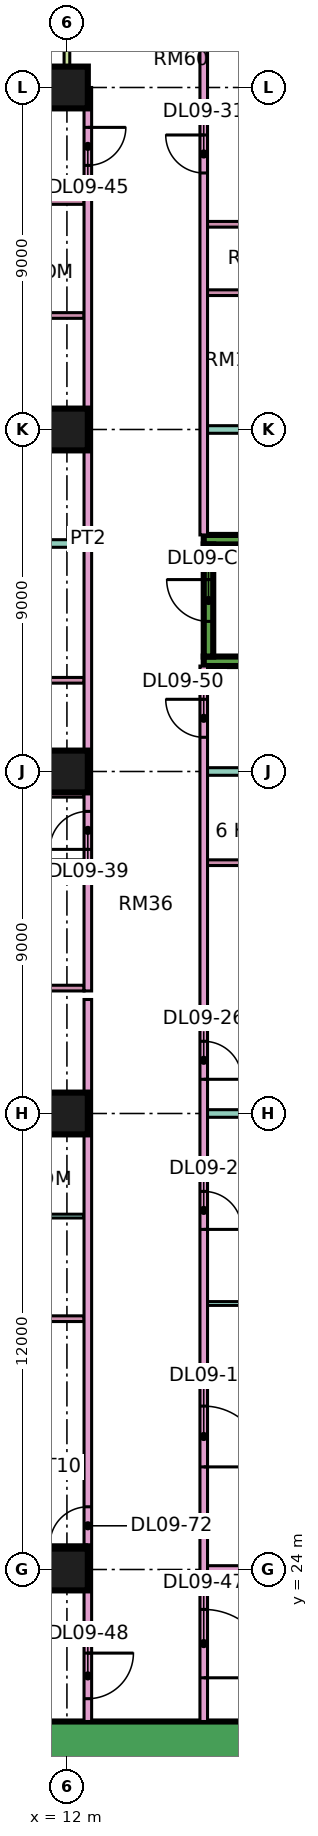
"""IFC4 building model, lengths in metres.
Left out: names, types, materials, properties, quantities, classifications, styles, units other than length and angle.
Written with IfcOpenShell. Run it as: python <this file> out.ifc"""

import sys

from ifc_helpers import new_model, si_unit, direction, frame, frame_2d, origin, origin_2d, place, context, subcontext, project, spatial, rectangle, extrude, element, fill, save


model = new_model("IFC4")
c1 = context("Model", 3, precision=1e-05, world=origin(), true_north=direction((0.0, 1.0)))
c2 = subcontext(c1, "Body", "Model", "MODEL_VIEW")
j1 = project(units=[si_unit("LENGTHUNIT", "METRE"), si_unit("PLANEANGLEUNIT", "RADIAN")], contexts=[c1])
p1 = place(None, origin())
s1 = spatial("IfcSite", under=j1, at=p1, CompositionType="ELEMENT")
p2 = place(p1, origin())
s2 = spatial("IfcBuilding", under=s1, at=p2, CompositionType="ELEMENT")
p3 = place(p2, frame((0.0, 0.0, 48.9)))
s3 = spatial("IfcBuildingStorey", under=s2, at=p3, CompositionType="ELEMENT", Elevation=48.9)
for number, where, z_axis, x_axis in (
    (1, (12.0, 24.0, 0.0), (0.0, 0.0, 1.0), (1.0, 0.0, 0.0)),
    (2, (12.0, 36.0, 0.0), (0.0, 0.0, 1.0), (1.0, 0.0, 0.0)),
    (3, (12.0, 45.0, 0.0), (0.0, 0.0, 1.0), (1.0, 0.0, 0.0)),
    (4, (12.0, 54.0, 0.0), (0.0, 0.0, 1.0), (1.0, 0.0, 0.0)),
    (5, (12.0, 63.0, 0.0), (0.0, 0.0, 1.0), (1.0, 0.0, 0.0)),
):
    element("IfcColumn", number, at=place(p3, frame(where, z_axis=z_axis, x_axis=x_axis)), inside=s3, PredefinedType="COLUMN", context=c2, shape_type="SweptSolid", body=[
        extrude(rectangle(XDim=1.1, YDim=1.1, at=origin_2d()), origin(), (0.0, 0.0, 1.0), 3.75),
    ])
p4 = place(p3, frame((9.0, 19.45, 0.0), z_axis=(0.0, 0.0, 1.0), x_axis=(1.0, 0.0, 0.0)))
e6 = element("IfcWall", 6, at=p4, inside=s3, PredefinedType="SHEAR", context=c2, shape_type="SweptSolid", body=[
    extrude(rectangle(XDim=25.0, YDim=1.1, at=frame_2d((12.5, 0.0))), origin(), (0.0, 0.0, 1.0), 3.75),
])
p5 = place(p4, frame((19.1, 0.0, 0.0)))
e7 = element("IfcOpeningElement", 7, at=p5, cuts=e6, PredefinedType="OPENING", context=c2, shape_type="SweptSolid", body=[
    extrude(rectangle(XDim=1.8, YDim=2.4, at=frame_2d((0.9, 1.2))), frame((0.0, 0.56, 0.0), z_axis=(0.0, -1.0, 0.0), x_axis=(1.0, 0.0, 0.0)), (0.0, 0.0, 1.0), 1.12),
])
for number, where, z_axis, x_axis in (
    (8, (15.6, 47.9, 0.0), (0.0, 0.0, 1.0), (1.0, 0.0, 0.0)),
    (9, (15.6, 51.1, 0.0), (0.0, 0.0, 1.0), (1.0, 0.0, 0.0)),
):
    element("IfcWall", number, at=place(p3, frame(where, z_axis=z_axis, x_axis=x_axis)), inside=s3, PredefinedType="SHEAR", context=c2, shape_type="SweptSolid", body=[
        extrude(rectangle(XDim=7.0, YDim=0.25, at=frame_2d((3.5, 0.0))), origin(), (0.0, 0.0, 1.0), 3.75),
    ])
p6 = place(p3, frame((15.725, 48.025, 0.0), z_axis=(0.0, 0.0, 1.0), x_axis=(0.0, 1.0, 0.0)))
e10 = element("IfcWall", 10, at=p6, inside=s3, PredefinedType="SHEAR", context=c2, shape_type="SweptSolid", body=[
    extrude(rectangle(XDim=2.95, YDim=0.25, at=frame_2d((1.475, 0.0))), origin(), (0.0, 0.0, 1.0), 3.75),
])
p7 = place(p6, frame((0.925, 0.0, 0.0)))
e11 = element("IfcOpeningElement", 11, at=p7, cuts=e10, PredefinedType="OPENING", context=c2, shape_type="SweptSolid", body=[
    extrude(rectangle(XDim=1.1, YDim=2.2, at=frame_2d((0.55, 1.1))), frame((0.0, 0.135, 0.0), z_axis=(0.0, -1.0, 0.0), x_axis=(1.0, 0.0, 0.0)), (0.0, 0.0, 1.0), 0.27),
])
p8 = place(p3, frame((11.925, 63.0, 0.0), z_axis=(0.0, 0.0, 1.0), x_axis=(-1.0, 0.0, 0.0)))
e12 = element("IfcWall", 12, at=p8, inside=s3, PredefinedType="SOLIDWALL", context=c2, shape_type="SweptSolid", body=[
    extrude(rectangle(XDim=10.35, YDim=0.15, at=frame_2d((5.175, 0.0))), origin(), (0.0, 0.0, 1.0), 3.35),
])
p9 = place(p8, frame((1.775, 0.0, 0.0)))
e13 = element("IfcOpeningElement", 13, at=p9, cuts=e12, PredefinedType="OPENING", context=c2, shape_type="SweptSolid", body=[
    extrude(rectangle(XDim=1.8, YDim=2.4, at=frame_2d((0.9, 1.2))), frame((0.0, 0.085, 0.0), z_axis=(0.0, -1.0, 0.0), x_axis=(1.0, 0.0, 0.0)), (0.0, 0.0, 1.0), 0.17),
])
p10 = place(p8, frame((6.062, 0.0, 0.45)))
e14 = element("IfcOpeningElement", 14, at=p10, cuts=e12, PredefinedType="OPENING", context=c2, shape_type="SweptSolid", body=[
    extrude(rectangle(XDim=3.0, YDim=2.4, at=frame_2d((1.5, 1.2))), frame((0.0, 0.085, 0.0), z_axis=(0.0, -1.0, 0.0), x_axis=(1.0, 0.0, 0.0)), (0.0, 0.0, 1.0), 0.17),
])
p11 = place(p3, frame((12.0, 64.5, 0.0), z_axis=(0.0, 0.0, 1.0), x_axis=(0.0, -1.0, 0.0)))
e15 = element("IfcWall", 15, at=p11, inside=s3, PredefinedType="SOLIDWALL", context=c2, shape_type="SweptSolid", body=[
    extrude(rectangle(XDim=1.5, YDim=0.15, at=frame_2d((0.75, 0.0))), origin(), (0.0, 0.0, 1.0), 3.35),
])
p12 = place(p3, frame((-1.35, 22.4, 0.0), z_axis=(0.0, 0.0, 1.0), x_axis=(1.0, 0.0, 0.0)))
e16 = element("IfcWall", 16, at=p12, inside=s3, PredefinedType="PARTITIONING", context=c2, shape_type="SweptSolid", body=[
    extrude(rectangle(XDim=13.8, YDim=0.2, at=frame_2d((6.9, 0.0))), origin(), (0.0, 0.0, 1.0), 3.35),
])
p13 = place(p3, frame((0.0, 36.0, 0.0), z_axis=(0.0, 0.0, 1.0), x_axis=(1.0, 0.0, 0.0)))
e17 = element("IfcWall", 17, at=p13, inside=s3, PredefinedType="PARTITIONING", context=c2, shape_type="SweptSolid", body=[
    extrude(rectangle(XDim=12.45, YDim=0.2, at=frame_2d((6.225, 0.0))), origin(), (0.0, 0.0, 1.0), 3.35),
])
p14 = place(p3, frame((0.074, 51.0, 0.0), z_axis=(0.0, 0.0, 1.0), x_axis=(1.0, 0.0, 0.0)))
e18 = element("IfcWall", 18, at=p14, inside=s3, PredefinedType="PARTITIONING", context=c2, shape_type="SweptSolid", body=[
    extrude(rectangle(XDim=12.376, YDim=0.2, at=frame_2d((6.188, 0.0))), origin(), (0.0, 0.0, 1.0), 3.35),
])
p15 = place(p3, frame((7.075, 39.3, 0.0), z_axis=(0.0, 0.0, 1.0), x_axis=(1.0, 0.0, 0.0)))
e19 = element("IfcWall", 19, at=p15, inside=s3, PredefinedType="PARTITIONING", context=c2, shape_type="SweptSolid", body=[
    extrude(rectangle(XDim=5.375, YDim=0.15, at=frame_2d((2.688, 0.0))), origin(), (0.0, 0.0, 1.0), 3.35),
])
p16 = place(p3, frame((7.075, 42.6, 0.0), z_axis=(0.0, 0.0, 1.0), x_axis=(1.0, 0.0, 0.0)))
e20 = element("IfcWall", 20, at=p16, inside=s3, PredefinedType="PARTITIONING", context=c2, shape_type="SweptSolid", body=[
    extrude(rectangle(XDim=5.375, YDim=0.15, at=frame_2d((2.688, 0.0))), origin(), (0.0, 0.0, 1.0), 3.35),
])
p17 = place(p16, frame((2.425, 0.0, 0.0)))
e21 = element("IfcOpeningElement", 21, at=p17, cuts=e20, PredefinedType="OPENING", context=c2, shape_type="SweptSolid", body=[
    extrude(rectangle(XDim=0.8, YDim=2.1, at=frame_2d((0.4, 1.05))), frame((0.0, 0.085, 0.0), z_axis=(0.0, -1.0, 0.0), x_axis=(1.0, 0.0, 0.0)), (0.0, 0.0, 1.0), 0.17),
])
for number, where, z_axis, x_axis in (
    (22, (7.225, 44.4, 0.0), (0.0, 0.0, 1.0), (1.0, 0.0, 0.0)),
    (23, (7.225, 47.4, 0.0), (0.0, 0.0, 1.0), (1.0, 0.0, 0.0)),
):
    element("IfcWall", number, at=place(p3, frame(where, z_axis=z_axis, x_axis=x_axis)), inside=s3, PredefinedType="PARTITIONING", context=c2, shape_type="SweptSolid", body=[
        extrude(rectangle(XDim=5.225, YDim=0.15, at=frame_2d((2.612, 0.0))), origin(), (0.0, 0.0, 1.0), 3.35),
    ])
p18 = place(p3, frame((7.825, 26.7, 0.0), z_axis=(0.0, 0.0, 1.0), x_axis=(1.0, 0.0, 0.0)))
e24 = element("IfcWall", 24, at=p18, inside=s3, PredefinedType="PARTITIONING", context=c2, shape_type="SweptSolid", body=[
    extrude(rectangle(XDim=4.625, YDim=0.15, at=frame_2d((2.312, 0.0))), origin(), (0.0, 0.0, 1.0), 3.35),
])
p19 = place(p18, frame((1.975, 0.0, 0.0)))
e25 = element("IfcOpeningElement", 25, at=p19, cuts=e24, PredefinedType="OPENING", context=c2, shape_type="SweptSolid", body=[
    extrude(rectangle(XDim=0.8, YDim=2.1, at=frame_2d((0.4, 1.05))), frame((0.0, 0.085, 0.0), z_axis=(0.0, -1.0, 0.0), x_axis=(1.0, 0.0, 0.0)), (0.0, 0.0, 1.0), 0.17),
])
p20 = place(p3, frame((7.825, 30.6, 0.0), z_axis=(0.0, 0.0, 1.0), x_axis=(1.0, 0.0, 0.0)))
e26 = element("IfcWall", 26, at=p20, inside=s3, PredefinedType="PARTITIONING", context=c2, shape_type="SweptSolid", body=[
    extrude(rectangle(XDim=4.625, YDim=0.15, at=frame_2d((2.312, 0.0))), origin(), (0.0, 0.0, 1.0), 3.35),
])
p21 = place(p3, frame((7.825, 33.3, 0.0), z_axis=(0.0, 0.0, 1.0), x_axis=(1.0, 0.0, 0.0)))
e27 = element("IfcWall", 27, at=p21, inside=s3, PredefinedType="PARTITIONING", context=c2, shape_type="SweptSolid", body=[
    extrude(rectangle(XDim=4.625, YDim=0.1, at=frame_2d((2.312, 0.0))), origin(), (0.0, 0.0, 1.0), 3.35),
])
for number, where, z_axis, x_axis in (
    (28, (8.425, 57.0, 0.0), (0.0, 0.0, 1.0), (1.0, 0.0, 0.0)),
    (29, (8.425, 60.0, 0.0), (0.0, 0.0, 1.0), (1.0, 0.0, 0.0)),
):
    element("IfcWall", number, at=place(p3, frame(where, z_axis=z_axis, x_axis=x_axis)), inside=s3, PredefinedType="PARTITIONING", context=c2, shape_type="SweptSolid", body=[
        extrude(rectangle(XDim=4.025, YDim=0.15, at=frame_2d((2.012, 0.0))), origin(), (0.0, 0.0, 1.0), 3.35),
    ])
p22 = place(p3, frame((12.55, 20.0, 0.0), z_axis=(0.0, 0.0, 1.0), x_axis=(0.0, 1.0, 0.0)))
e30 = element("IfcWall", 30, at=p22, inside=s3, PredefinedType="PARTITIONING", context=c2, shape_type="SweptSolid", body=[
    extrude(rectangle(XDim=19.0, YDim=0.2, at=frame_2d((9.5, 0.0))), origin(), (0.0, 0.0, 1.0), 3.35),
])
p23 = place(p22, frame((0.6, 0.0, 0.0)))
e31 = element("IfcOpeningElement", 31, at=p23, cuts=e30, PredefinedType="OPENING", context=c2, shape_type="SweptSolid", body=[
    extrude(rectangle(XDim=1.2, YDim=2.1, at=frame_2d((0.6, 1.05))), frame((0.0, 0.11, 0.0), z_axis=(0.0, -1.0, 0.0), x_axis=(1.0, 0.0, 0.0)), (0.0, 0.0, 1.0), 0.22),
])
p24 = place(p22, frame((4.65, 0.0, 0.0)))
e32 = element("IfcOpeningElement", 32, at=p24, cuts=e30, PredefinedType="OPENING", context=c2, shape_type="SweptSolid", body=[
    extrude(rectangle(XDim=1.0, YDim=2.1, at=frame_2d((0.5, 1.05))), frame((0.0, 0.11, 0.0), z_axis=(0.0, -1.0, 0.0), x_axis=(1.0, 0.0, 0.0)), (0.0, 0.0, 1.0), 0.22),
])
p25 = place(p3, frame((12.55, 39.225, 0.0), z_axis=(0.0, 0.0, 1.0), x_axis=(0.0, 1.0, 0.0)))
e33 = element("IfcWall", 33, at=p25, inside=s3, PredefinedType="PARTITIONING", context=c2, shape_type="SweptSolid", body=[
    extrude(rectangle(XDim=23.775, YDim=0.2, at=frame_2d((11.887, 0.0))), origin(), (0.0, 0.0, 1.0), 3.35),
])
p26 = place(p25, frame((3.725, 0.0, 0.0)))
e34 = element("IfcOpeningElement", 34, at=p26, cuts=e33, PredefinedType="OPENING", context=c2, shape_type="SweptSolid", body=[
    extrude(rectangle(XDim=1.0, YDim=2.1, at=frame_2d((0.5, 1.05))), frame((0.0, 0.11, 0.0), z_axis=(0.0, -1.0, 0.0), x_axis=(1.0, 0.0, 0.0)), (0.0, 0.0, 1.0), 0.22),
])
p27 = place(p25, frame((21.725, 0.0, 0.0)))
e35 = element("IfcOpeningElement", 35, at=p27, cuts=e33, PredefinedType="OPENING", context=c2, shape_type="SweptSolid", body=[
    extrude(rectangle(XDim=1.0, YDim=2.1, at=frame_2d((0.5, 1.05))), frame((0.0, 0.11, 0.0), z_axis=(0.0, -1.0, 0.0), x_axis=(1.0, 0.0, 0.0)), (0.0, 0.0, 1.0), 0.22),
])
p28 = place(p3, frame((15.6, 20.0, 0.0), z_axis=(0.0, 0.0, 1.0), x_axis=(0.0, 1.0, 0.0)))
e36 = element("IfcWall", 36, at=p28, inside=s3, PredefinedType="PARTITIONING", context=c2, shape_type="SweptSolid", body=[
    extrude(rectangle(XDim=27.775, YDim=0.2, at=frame_2d((13.887, 0.0))), origin(), (0.0, 0.0, 1.0), 3.35),
])
p29 = place(p28, frame((6.7, 0.0, 0.0)))
e37 = element("IfcOpeningElement", 37, at=p29, cuts=e36, PredefinedType="OPENING", context=c2, shape_type="SweptSolid", body=[
    extrude(rectangle(XDim=1.6, YDim=2.1, at=frame_2d((0.8, 1.05))), frame((0.0, 0.11, 0.0), z_axis=(0.0, -1.0, 0.0), x_axis=(1.0, 0.0, 0.0)), (0.0, 0.0, 1.0), 0.22),
])
p30 = place(p28, frame((12.95, 0.0, 0.0)))
e38 = element("IfcOpeningElement", 38, at=p30, cuts=e36, PredefinedType="OPENING", context=c2, shape_type="SweptSolid", body=[
    extrude(rectangle(XDim=1.0, YDim=2.1, at=frame_2d((0.5, 1.05))), frame((0.0, 0.11, 0.0), z_axis=(0.0, -1.0, 0.0), x_axis=(1.0, 0.0, 0.0)), (0.0, 0.0, 1.0), 0.22),
])
p31 = place(p28, frame((16.9, 0.0, 0.0)))
e39 = element("IfcOpeningElement", 39, at=p31, cuts=e36, PredefinedType="OPENING", context=c2, shape_type="SweptSolid", body=[
    extrude(rectangle(XDim=1.0, YDim=2.1, at=frame_2d((0.5, 1.05))), frame((0.0, 0.11, 0.0), z_axis=(0.0, -1.0, 0.0), x_axis=(1.0, 0.0, 0.0)), (0.0, 0.0, 1.0), 0.22),
])
p32 = place(p28, frame((1.15, 0.0, 0.0)))
e40 = element("IfcOpeningElement", 40, at=p32, cuts=e36, PredefinedType="OPENING", context=c2, shape_type="SweptSolid", body=[
    extrude(rectangle(XDim=1.8, YDim=2.1, at=frame_2d((0.9, 1.05))), frame((0.0, 0.11, 0.0), z_axis=(0.0, -1.0, 0.0), x_axis=(1.0, 0.0, 0.0)), (0.0, 0.0, 1.0), 0.22),
])
p33 = place(p28, frame((25.9, 0.0, 0.0)))
e41 = element("IfcOpeningElement", 41, at=p33, cuts=e36, PredefinedType="OPENING", context=c2, shape_type="SweptSolid", body=[
    extrude(rectangle(XDim=1.0, YDim=2.1, at=frame_2d((0.5, 1.05))), frame((0.0, 0.11, 0.0), z_axis=(0.0, -1.0, 0.0), x_axis=(1.0, 0.0, 0.0)), (0.0, 0.0, 1.0), 0.22),
])
p34 = place(p3, frame((15.6, 51.225, 0.0), z_axis=(0.0, 0.0, 1.0), x_axis=(0.0, 1.0, 0.0)))
e42 = element("IfcWall", 42, at=p34, inside=s3, PredefinedType="PARTITIONING", context=c2, shape_type="SweptSolid", body=[
    extrude(rectangle(XDim=13.125, YDim=0.2, at=frame_2d((6.562, 0.0))), origin(), (0.0, 0.0, 1.0), 3.35),
])
p35 = place(p34, frame((9.525, 0.0, 0.0)))
e43 = element("IfcOpeningElement", 43, at=p35, cuts=e42, PredefinedType="OPENING", context=c2, shape_type="SweptSolid", body=[
    extrude(rectangle(XDim=1.0, YDim=2.1, at=frame_2d((0.5, 1.05))), frame((0.0, 0.11, 0.0), z_axis=(0.0, -1.0, 0.0), x_axis=(1.0, 0.0, 0.0)), (0.0, 0.0, 1.0), 0.22),
])
p36 = place(p3, frame((15.7, 24.0, 0.0), z_axis=(0.0, 0.0, 1.0), x_axis=(1.0, 0.0, 0.0)))
e44 = element("IfcWall", 44, at=p36, inside=s3, PredefinedType="PARTITIONING", context=c2, shape_type="SweptSolid", body=[
    extrude(rectangle(XDim=5.8, YDim=0.2, at=frame_2d((2.9, 0.0))), origin(), (0.0, 0.0, 1.0), 3.35),
])
p37 = place(p3, frame((15.7, 31.0, 0.0), z_axis=(0.0, 0.0, 1.0), x_axis=(1.0, 0.0, 0.0)))
e45 = element("IfcWall", 45, at=p37, inside=s3, PredefinedType="PARTITIONING", context=c2, shape_type="SweptSolid", body=[
    extrude(rectangle(XDim=5.8, YDim=0.1, at=frame_2d((2.9, 0.0))), origin(), (0.0, 0.0, 1.0), 3.35),
])
p38 = place(p3, frame((15.7, 36.0, 0.0), z_axis=(0.0, 0.0, 1.0), x_axis=(1.0, 0.0, 0.0)))
e46 = element("IfcWall", 46, at=p38, inside=s3, PredefinedType="PARTITIONING", context=c2, shape_type="SweptSolid", body=[
    extrude(rectangle(XDim=8.3, YDim=0.2, at=frame_2d((4.15, 0.0))), origin(), (0.0, 0.0, 1.0), 3.35),
])
for number, where, z_axis, x_axis in (
    (47, (15.7, 38.7, 0.0), (0.0, 0.0, 1.0), (1.0, 0.0, 0.0)),
    (48, (15.7, 42.6, 0.0), (0.0, 0.0, 1.0), (1.0, 0.0, 0.0)),
):
    element("IfcWall", number, at=place(p3, frame(where, z_axis=z_axis, x_axis=x_axis)), inside=s3, PredefinedType="PARTITIONING", context=c2, shape_type="SweptSolid", body=[
        extrude(rectangle(XDim=3.125, YDim=0.15, at=frame_2d((1.562, 0.0))), origin(), (0.0, 0.0, 1.0), 3.35),
    ])
p39 = place(p3, frame((15.7, 45.0, 0.0), z_axis=(0.0, 0.0, 1.0), x_axis=(1.0, 0.0, 0.0)))
e49 = element("IfcWall", 49, at=p39, inside=s3, PredefinedType="PARTITIONING", context=c2, shape_type="SweptSolid", body=[
    extrude(rectangle(XDim=8.3, YDim=0.2, at=frame_2d((4.15, 0.0))), origin(), (0.0, 0.0, 1.0), 3.35),
])
p40 = place(p3, frame((15.7, 54.0, 0.0), z_axis=(0.0, 0.0, 1.0), x_axis=(1.0, 0.0, 0.0)))
e50 = element("IfcWall", 50, at=p40, inside=s3, PredefinedType="PARTITIONING", context=c2, shape_type="SweptSolid", body=[
    extrude(rectangle(XDim=8.226, YDim=0.2, at=frame_2d((4.113, 0.0))), origin(), (0.0, 0.0, 1.0), 3.35),
])
for number, where, z_axis, x_axis in (
    (51, (15.7, 57.6, 0.0), (0.0, 0.0, 1.0), (1.0, 0.0, 0.0)),
    (52, (15.7, 59.4, 0.0), (0.0, 0.0, 1.0), (1.0, 0.0, 0.0)),
):
    element("IfcWall", number, at=place(p3, frame(where, z_axis=z_axis, x_axis=x_axis)), inside=s3, PredefinedType="PARTITIONING", context=c2, shape_type="SweptSolid", body=[
        extrude(rectangle(XDim=2.525, YDim=0.15, at=frame_2d((1.263, 0.0))), origin(), (0.0, 0.0, 1.0), 3.35),
    ])
p41 = place(p7, frame((1.1, 0.0, 0.0), z_axis=(0.0, 0.0, 1.0), x_axis=(-1.0, 0.0, 0.0)))
e53 = element("IfcDoor", 53, at=p41, inside=s3, OperationType="SINGLE_SWING_RIGHT", PredefinedType="DOOR", context=c2, shape_type="SweptSolid", body=[
    extrude(rectangle(XDim=1.1, YDim=2.2, at=frame_2d((0.55, 1.1))), frame((0.0, 0.025, 0.0), z_axis=(0.0, -1.0, 0.0), x_axis=(1.0, 0.0, 0.0)), (0.0, 0.0, 1.0), 0.05),
])
fill(e11, e53)
p42 = place(p29, frame((1.6, 0.0, 0.0), z_axis=(0.0, 0.0, 1.0), x_axis=(-1.0, 0.0, 0.0)))
e54 = element("IfcDoor", 54, at=p42, inside=s3, OperationType="DOUBLE_DOOR_SINGLE_SWING", PredefinedType="DOOR", context=c2, shape_type="SweptSolid", body=[
    extrude(rectangle(XDim=1.6, YDim=2.1, at=frame_2d((0.8, 1.05))), frame((0.0, 0.025, 0.0), z_axis=(0.0, -1.0, 0.0), x_axis=(1.0, 0.0, 0.0)), (0.0, 0.0, 1.0), 0.05),
])
fill(e37, e54)
p43 = place(p30, frame((1.0, 0.0, 0.0), z_axis=(0.0, 0.0, 1.0), x_axis=(-1.0, 0.0, 0.0)))
e55 = element("IfcDoor", 55, at=p43, inside=s3, OperationType="SINGLE_SWING_LEFT", PredefinedType="DOOR", context=c2, shape_type="SweptSolid", body=[
    extrude(rectangle(XDim=1.0, YDim=2.1, at=frame_2d((0.5, 1.05))), frame((0.0, 0.025, 0.0), z_axis=(0.0, -1.0, 0.0), x_axis=(1.0, 0.0, 0.0)), (0.0, 0.0, 1.0), 0.05),
])
fill(e38, e55)
p44 = place(p31, frame((1.0, 0.0, 0.0), z_axis=(0.0, 0.0, 1.0), x_axis=(-1.0, 0.0, 0.0)))
e56 = element("IfcDoor", 56, at=p44, inside=s3, OperationType="SINGLE_SWING_LEFT", PredefinedType="DOOR", context=c2, shape_type="SweptSolid", body=[
    extrude(rectangle(XDim=1.0, YDim=2.1, at=frame_2d((0.5, 1.05))), frame((0.0, 0.025, 0.0), z_axis=(0.0, -1.0, 0.0), x_axis=(1.0, 0.0, 0.0)), (0.0, 0.0, 1.0), 0.05),
])
fill(e39, e56)
p45 = place(p35, frame((1.0, 0.0, 0.0), z_axis=(0.0, 0.0, 1.0), x_axis=(-1.0, 0.0, 0.0)))
e57 = element("IfcDoor", 57, at=p45, inside=s3, OperationType="SINGLE_SWING_RIGHT", PredefinedType="DOOR", context=c2, shape_type="SweptSolid", body=[
    extrude(rectangle(XDim=1.0, YDim=2.1, at=frame_2d((0.5, 1.05))), frame((0.0, 0.025, 0.0), z_axis=(0.0, -1.0, 0.0), x_axis=(1.0, 0.0, 0.0)), (0.0, 0.0, 1.0), 0.05),
])
fill(e43, e57)
p46 = place(p26, origin())
e58 = element("IfcDoor", 58, at=p46, inside=s3, OperationType="SINGLE_SWING_LEFT", PredefinedType="DOOR", context=c2, shape_type="SweptSolid", body=[
    extrude(rectangle(XDim=1.0, YDim=2.1, at=frame_2d((0.5, 1.05))), frame((0.0, 0.025, 0.0), z_axis=(0.0, -1.0, 0.0), x_axis=(1.0, 0.0, 0.0)), (0.0, 0.0, 1.0), 0.05),
])
fill(e34, e58)
p47 = place(p27, origin())
e59 = element("IfcDoor", 59, at=p47, inside=s3, OperationType="SINGLE_SWING_RIGHT", PredefinedType="DOOR", context=c2, shape_type="SweptSolid", body=[
    extrude(rectangle(XDim=1.0, YDim=2.1, at=frame_2d((0.5, 1.05))), frame((0.0, 0.025, 0.0), z_axis=(0.0, -1.0, 0.0), x_axis=(1.0, 0.0, 0.0)), (0.0, 0.0, 1.0), 0.05),
])
fill(e35, e59)
p48 = place(p32, frame((1.8, 0.0, 0.0), z_axis=(0.0, 0.0, 1.0), x_axis=(-1.0, 0.0, 0.0)))
e60 = element("IfcDoor", 60, at=p48, inside=s3, OperationType="DOUBLE_DOOR_SINGLE_SWING", PredefinedType="DOOR", context=c2, shape_type="SweptSolid", body=[
    extrude(rectangle(XDim=1.8, YDim=2.1, at=frame_2d((0.9, 1.05))), frame((0.0, 0.025, 0.0), z_axis=(0.0, -1.0, 0.0), x_axis=(1.0, 0.0, 0.0)), (0.0, 0.0, 1.0), 0.05),
])
fill(e40, e60)
p49 = place(p23, origin())
e61 = element("IfcDoor", 61, at=p49, inside=s3, OperationType="SINGLE_SWING_RIGHT", PredefinedType="DOOR", context=c2, shape_type="SweptSolid", body=[
    extrude(rectangle(XDim=1.2, YDim=2.1, at=frame_2d((0.6, 1.05))), frame((0.0, 0.025, 0.0), z_axis=(0.0, -1.0, 0.0), x_axis=(1.0, 0.0, 0.0)), (0.0, 0.0, 1.0), 0.05),
])
fill(e31, e61)
p50 = place(p33, frame((1.0, 0.0, 0.0), z_axis=(0.0, 0.0, 1.0), x_axis=(-1.0, 0.0, 0.0)))
e62 = element("IfcDoor", 62, at=p50, inside=s3, OperationType="SINGLE_SWING_RIGHT", PredefinedType="DOOR", context=c2, shape_type="SweptSolid", body=[
    extrude(rectangle(XDim=1.0, YDim=2.1, at=frame_2d((0.5, 1.05))), frame((0.0, 0.025, 0.0), z_axis=(0.0, -1.0, 0.0), x_axis=(1.0, 0.0, 0.0)), (0.0, 0.0, 1.0), 0.05),
])
fill(e41, e62)
p51 = place(p24, origin())
e63 = element("IfcDoor", 63, at=p51, inside=s3, OperationType="SINGLE_SWING_LEFT", PredefinedType="DOOR", context=c2, shape_type="SweptSolid", body=[
    extrude(rectangle(XDim=1.0, YDim=2.1, at=frame_2d((0.5, 1.05))), frame((0.0, 0.025, 0.0), z_axis=(0.0, -1.0, 0.0), x_axis=(1.0, 0.0, 0.0)), (0.0, 0.0, 1.0), 0.05),
])
fill(e32, e63)
save(model, sys.argv[1])
